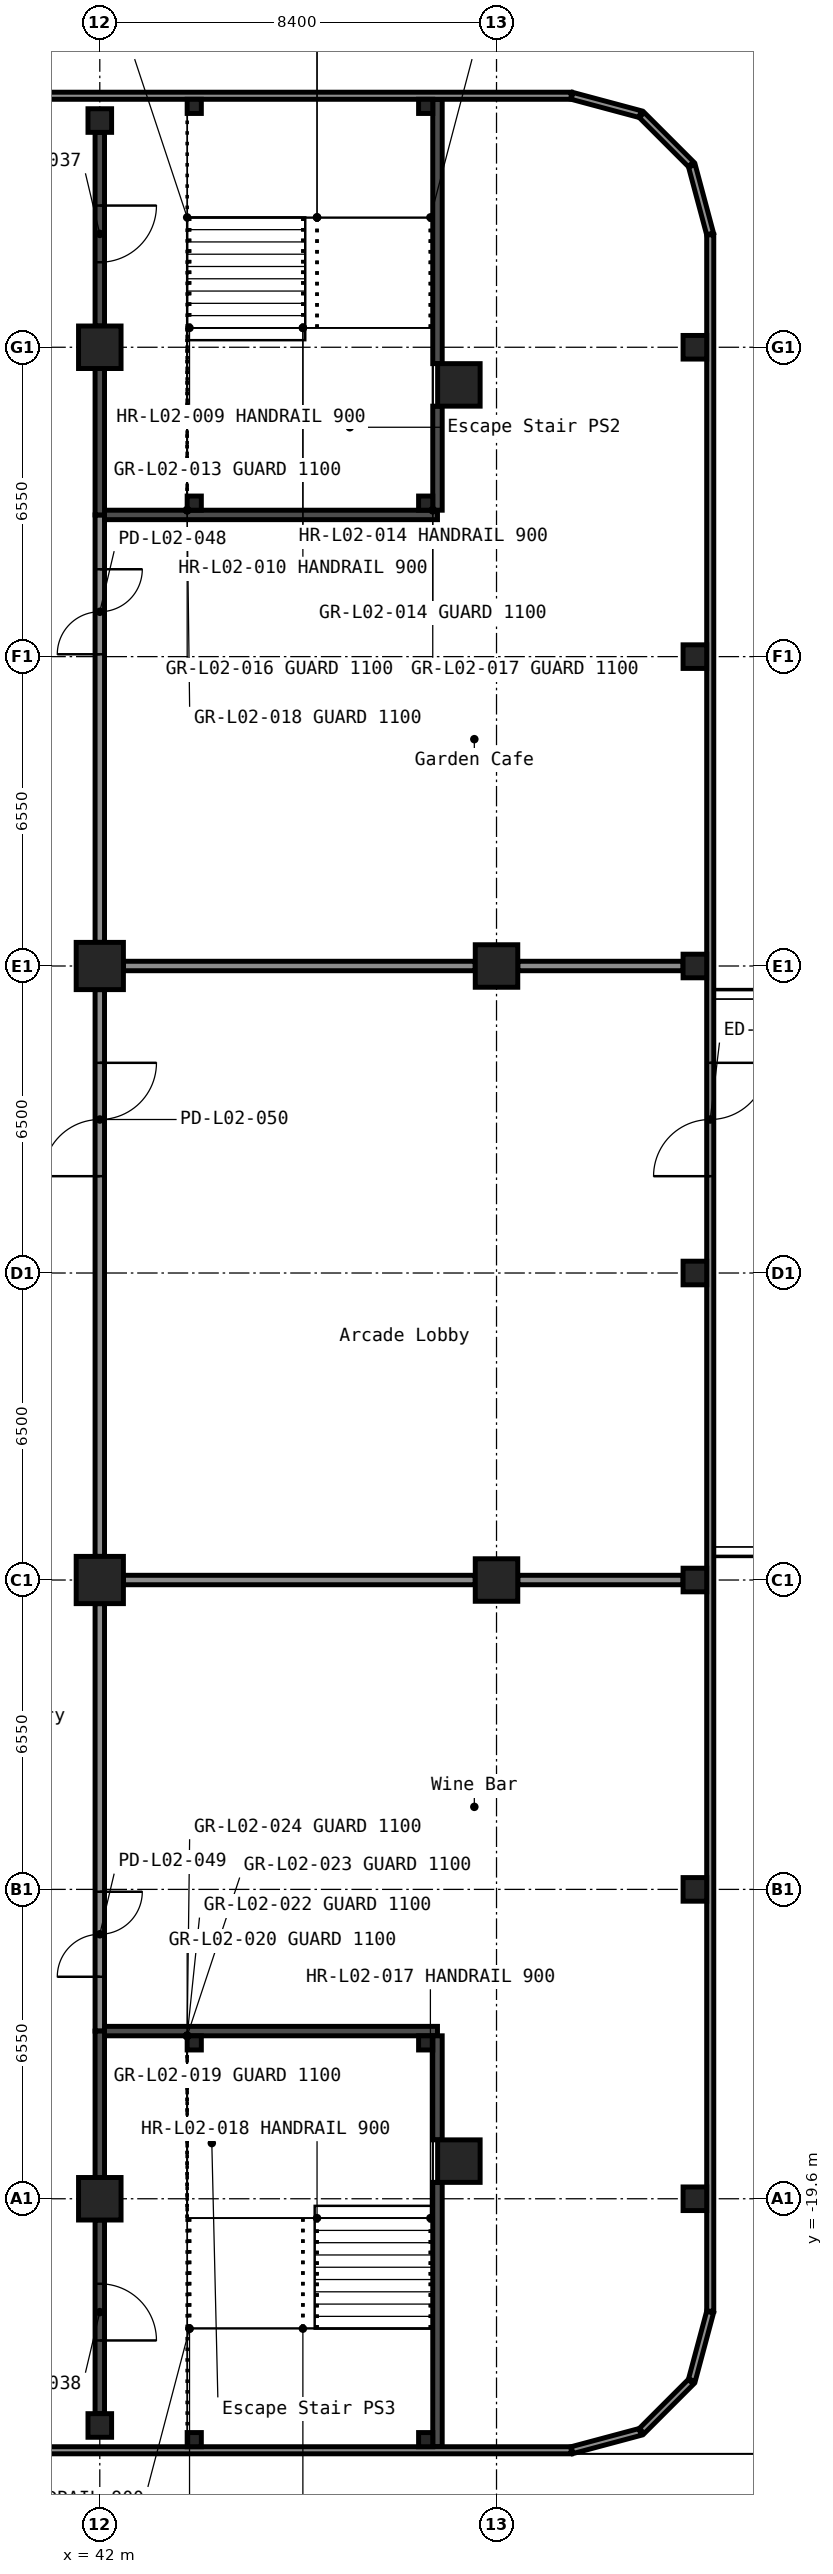
"""IFC4 building model, lengths in metres.
Left out: names, types, materials, properties, quantities, classifications, styles, units other than length and angle.
Written with IfcOpenShell. Run it as: python <this file> out.ifc"""

import sys

from ifc_helpers import new_model, si_unit, direction, frame, frame_2d, origin, origin_2d, place, context, subcontext, project, spatial, rectangle, hollow_rectangle, extrude, element, fill, save


model = new_model("IFC4")
c1 = context("Model", 3, precision=1e-05, world=origin(), true_north=direction((0.0, 1.0)))
c2 = subcontext(c1, "Body", "Model", "MODEL_VIEW")
j1 = project(units=[si_unit("LENGTHUNIT", "METRE"), si_unit("PLANEANGLEUNIT", "RADIAN")], contexts=[c1])
p1 = place(None, origin())
s1 = spatial("IfcSite", under=j1, at=p1, CompositionType="ELEMENT")
p2 = place(p1, origin())
s2 = spatial("IfcBuilding", under=s1, at=p2, CompositionType="ELEMENT")
p3 = place(p2, frame((0.0, 0.0, 9.0)))
s3 = spatial("IfcBuildingStorey", under=s2, at=p3, CompositionType="ELEMENT", Elevation=9.0)
p4 = place(p3, frame((42.0, -19.6, 0.0), z_axis=(0.0, 0.0, 1.0), x_axis=(1.0, 0.0, 0.0)))
e1 = element("IfcColumn", 1, at=p4, inside=s3, PredefinedType="COLUMN", context=c2, shape_type="SweptSolid", body=[
    extrude(hollow_rectangle(XDim=0.9, YDim=0.9, WallThickness=0.036, at=origin_2d()), origin(), (0.0, 0.0, 1.0), 5.6),
])
for number, where, z_axis, x_axis in (
    (2, (42.0, -6.5, 0.0), (0.0, 0.0, 1.0), (1.0, 0.0, 0.0)),
    (3, (42.0, 6.5, 0.0), (0.0, 0.0, 1.0), (1.0, 0.0, 0.0)),
):
    element("IfcColumn", number, at=place(p3, frame(where, z_axis=z_axis, x_axis=x_axis)), inside=s3, PredefinedType="COLUMN", context=c2, shape_type="SweptSolid", body=[
        extrude(hollow_rectangle(XDim=1.0, YDim=1.0, WallThickness=0.04, at=origin_2d()), origin(), (0.0, 0.0, 1.0), 5.6),
    ])
for number, where, z_axis, x_axis in (
    (4, (42.0, 19.6, 0.0), (0.0, 0.0, 1.0), (1.0, 0.0, 0.0)),
    (5, (49.603, -18.803, 0.0), (0.0, 0.0, 1.0), (1.0, 0.0, 0.0)),
    (6, (50.4, -6.5, 0.0), (0.0, 0.0, 1.0), (1.0, 0.0, 0.0)),
    (7, (50.4, 6.5, 0.0), (0.0, 0.0, 1.0), (1.0, 0.0, 0.0)),
    (8, (49.603, 18.803, 0.0), (0.0, 0.0, 1.0), (1.0, 0.0, 0.0)),
):
    element("IfcColumn", number, at=place(p3, frame(where, z_axis=z_axis, x_axis=x_axis)), inside=s3, PredefinedType="COLUMN", context=c2, shape_type="SweptSolid", body=[
        extrude(hollow_rectangle(XDim=0.9, YDim=0.9, WallThickness=0.036, at=origin_2d()), origin(), (0.0, 0.0, 1.0), 5.6),
    ])
for number, where, z_axis, x_axis in (
    (9, (42.0, -24.4, 0.0), (0.0, 0.0, 1.0), (1.0, 0.0, 0.0)),
    (10, (42.0, 24.4, 0.0), (0.0, 0.0, 1.0), (1.0, 0.0, 0.0)),
    (11, (54.6, -19.6, 0.0), (0.0, 0.0, 1.0), (1.0, 0.0, 0.0)),
    (12, (54.6, -13.05, 0.0), (0.0, 0.0, 1.0), (1.0, 0.0, 0.0)),
    (13, (54.6, -6.5, 0.0), (0.0, 0.0, 1.0), (1.0, 0.0, 0.0)),
    (14, (54.6, 0.0, 0.0), (0.0, 0.0, 1.0), (1.0, 0.0, 0.0)),
    (15, (54.6, 6.5, 0.0), (0.0, 0.0, 1.0), (1.0, 0.0, 0.0)),
    (16, (54.6, 13.05, 0.0), (0.0, 0.0, 1.0), (1.0, 0.0, 0.0)),
    (17, (54.6, 19.6, 0.0), (0.0, 0.0, 1.0), (1.0, 0.0, 0.0)),
):
    element("IfcColumn", number, at=place(p3, frame(where, z_axis=z_axis, x_axis=x_axis)), inside=s3, PredefinedType="COLUMN", context=c2, shape_type="SweptSolid", body=[
        extrude(hollow_rectangle(XDim=0.5, YDim=0.5, WallThickness=0.019, InnerFilletRadius=0.029, OuterFilletRadius=0.048, at=origin_2d()), origin(), (0.0, 0.0, 1.0), 5.6),
    ])
for number, where, z_axis, x_axis in (
    (18, (44.0, 16.3, -0.3), (0.0, 0.0, 1.0), (1.0, 0.0, 0.0)),
    (19, (48.9, 16.3, -0.3), (0.0, 0.0, 1.0), (1.0, 0.0, 0.0)),
    (20, (48.9, -16.3, -0.3), (0.0, 0.0, 1.0), (1.0, 0.0, 0.0)),
    (21, (44.0, -16.3, -0.3), (0.0, 0.0, 1.0), (1.0, 0.0, 0.0)),
):
    element("IfcColumn", number, at=place(p3, frame(where, z_axis=z_axis, x_axis=x_axis)), inside=s3, PredefinedType="COLUMN", context=c2, shape_type="SweptSolid", body=[
        extrude(rectangle(XDim=0.3, YDim=0.3, at=origin_2d()), origin(), (0.0, 0.0, 1.0), 1.55),
    ])
p5 = place(p3, frame((54.35, -6.5, 0.0), z_axis=(0.0, 0.0, 1.0), x_axis=(-1.0, 0.0, 0.0)))
e22 = element("IfcWall", 22, at=p5, inside=s3, PredefinedType="PARTITIONING", context=c2, shape_type="SweptSolid", body=[
    extrude(rectangle(XDim=3.5, YDim=0.2, at=frame_2d((1.75, 0.0))), origin(), (0.0, 0.0, 1.0), 5.6),
])
p6 = place(p3, frame((49.95, -6.5, 0.0), z_axis=(0.0, 0.0, 1.0), x_axis=(-1.0, 0.0, 0.0)))
e23 = element("IfcWall", 23, at=p6, inside=s3, PredefinedType="PARTITIONING", context=c2, shape_type="SweptSolid", body=[
    extrude(rectangle(XDim=7.45, YDim=0.2, at=frame_2d((3.725, 0.0))), origin(), (0.0, 0.0, 1.0), 5.6),
])
p7 = place(p3, frame((54.35, 6.5, 0.0), z_axis=(0.0, 0.0, 1.0), x_axis=(-1.0, 0.0, 0.0)))
e24 = element("IfcWall", 24, at=p7, inside=s3, PredefinedType="PARTITIONING", context=c2, shape_type="SweptSolid", body=[
    extrude(rectangle(XDim=3.5, YDim=0.2, at=frame_2d((1.75, 0.0))), origin(), (0.0, 0.0, 1.0), 5.6),
])
p8 = place(p3, frame((49.95, 6.5, 0.0), z_axis=(0.0, 0.0, 1.0), x_axis=(-1.0, 0.0, 0.0)))
e25 = element("IfcWall", 25, at=p8, inside=s3, PredefinedType="PARTITIONING", context=c2, shape_type="SweptSolid", body=[
    extrude(rectangle(XDim=7.45, YDim=0.2, at=frame_2d((3.725, 0.0))), origin(), (0.0, 0.0, 1.0), 5.6),
])
p9 = place(p3, frame((42.0, 6.0, 0.0), z_axis=(0.0, 0.0, 1.0), x_axis=(0.0, -1.0, 0.0)))
e26 = element("IfcWall", 26, at=p9, inside=s3, PredefinedType="PARTITIONING", context=c2, shape_type="SweptSolid", body=[
    extrude(rectangle(XDim=12.0, YDim=0.2, at=frame_2d((6.0, 0.0))), origin(), (0.0, 0.0, 1.0), 5.6),
])
p10 = place(p9, frame((1.55, 0.0, 0.0)))
e27 = element("IfcOpeningElement", 27, at=p10, cuts=e26, PredefinedType="OPENING", context=c2, shape_type="SweptSolid", body=[
    extrude(rectangle(XDim=2.4, YDim=2.1, at=frame_2d((1.2, 1.05))), frame((0.0, 0.11, 0.0), z_axis=(0.0, -1.0, 0.0), x_axis=(1.0, 0.0, 0.0)), (0.0, 0.0, 1.0), 0.22),
])
p11 = place(p3, frame((42.0, -7.0, 0.0), z_axis=(0.0, 0.0, 1.0), x_axis=(0.0, -1.0, 0.0)))
e28 = element("IfcWall", 28, at=p11, inside=s3, PredefinedType="PARTITIONING", context=c2, shape_type="SweptSolid", body=[
    extrude(rectangle(XDim=9.05, YDim=0.2, at=frame_2d((4.525, 0.0))), origin(), (0.0, 0.0, 1.0), 5.6),
])
p12 = place(p11, frame((6.1, 0.0, 0.0)))
e29 = element("IfcOpeningElement", 29, at=p12, cuts=e28, PredefinedType="OPENING", context=c2, shape_type="SweptSolid", body=[
    extrude(rectangle(XDim=1.8, YDim=2.1, at=frame_2d((0.9, 1.05))), frame((0.0, 0.11, 0.0), z_axis=(0.0, -1.0, 0.0), x_axis=(1.0, 0.0, 0.0)), (0.0, 0.0, 1.0), 0.22),
])
p13 = place(p3, frame((42.0, 16.05, 0.0), z_axis=(0.0, 0.0, 1.0), x_axis=(0.0, -1.0, 0.0)))
e30 = element("IfcWall", 30, at=p13, inside=s3, PredefinedType="PARTITIONING", context=c2, shape_type="SweptSolid", body=[
    extrude(rectangle(XDim=9.05, YDim=0.2, at=frame_2d((4.525, 0.0))), origin(), (0.0, 0.0, 1.0), 5.6),
])
p14 = place(p13, frame((1.15, 0.0, 0.0)))
e31 = element("IfcOpeningElement", 31, at=p14, cuts=e30, PredefinedType="OPENING", context=c2, shape_type="SweptSolid", body=[
    extrude(rectangle(XDim=1.8, YDim=2.1, at=frame_2d((0.9, 1.05))), frame((0.0, 0.11, 0.0), z_axis=(0.0, -1.0, 0.0), x_axis=(1.0, 0.0, 0.0)), (0.0, 0.0, 1.0), 0.22),
])
p15 = place(p3, frame((49.15, 16.05, 0.0), z_axis=(0.0, 0.0, 1.0), x_axis=(-1.0, 0.0, 0.0)))
e32 = element("IfcWall", 32, at=p15, inside=s3, PredefinedType="SHEAR", context=c2, shape_type="SweptSolid", body=[
    extrude(rectangle(XDim=7.05, YDim=0.2, at=frame_2d((3.525, 0.0))), origin(), (0.0, 0.0, 1.0), 5.6),
])
p16 = place(p3, frame((49.15, 24.85, 0.0), z_axis=(0.0, 0.0, 1.0), x_axis=(0.0, -1.0, 0.0)))
e33 = element("IfcWall", 33, at=p16, inside=s3, PredefinedType="SHEAR", context=c2, shape_type="SweptSolid", body=[
    extrude(rectangle(XDim=5.597, YDim=0.2, at=frame_2d((2.798, 0.0))), origin(), (0.0, 0.0, 1.0), 5.6),
])
p17 = place(p3, frame((49.15, 18.353, 0.0), z_axis=(0.0, 0.0, 1.0), x_axis=(0.0, -1.0, 0.0)))
e34 = element("IfcWall", 34, at=p17, inside=s3, PredefinedType="SHEAR", context=c2, shape_type="SweptSolid", body=[
    extrude(rectangle(XDim=2.203, YDim=0.2, at=frame_2d((1.102, 0.0))), origin(), (0.0, 0.0, 1.0), 5.6),
])
p18 = place(p3, frame((42.0, 16.05, 0.0), z_axis=(0.0, 0.0, 1.0), x_axis=(0.0, 1.0, 0.0)))
e35 = element("IfcWall", 35, at=p18, inside=s3, PredefinedType="SHEAR", context=c2, shape_type="SweptSolid", body=[
    extrude(rectangle(XDim=3.1, YDim=0.2, at=frame_2d((1.55, 0.0))), origin(), (0.0, 0.0, 1.0), 5.6),
])
p19 = place(p3, frame((42.0, 20.05, 0.0), z_axis=(0.0, 0.0, 1.0), x_axis=(0.0, 1.0, 0.0)))
e36 = element("IfcWall", 36, at=p19, inside=s3, PredefinedType="SHEAR", context=c2, shape_type="SweptSolid", body=[
    extrude(rectangle(XDim=4.1, YDim=0.2, at=frame_2d((2.05, 0.0))), origin(), (0.0, 0.0, 1.0), 5.6),
])
p20 = place(p19, frame((1.35, 0.0, 0.0)))
e37 = element("IfcOpeningElement", 37, at=p20, cuts=e36, PredefinedType="OPENING", context=c2, shape_type="SweptSolid", body=[
    extrude(rectangle(XDim=1.2, YDim=2.1, at=frame_2d((0.6, 1.05))), frame((0.0, 0.11, 0.0), z_axis=(0.0, -1.0, 0.0), x_axis=(1.0, 0.0, 0.0)), (0.0, 0.0, 1.0), 0.22),
])
p21 = place(p3, frame((42.1, -16.05, 0.0), z_axis=(0.0, 0.0, 1.0), x_axis=(1.0, 0.0, 0.0)))
e38 = element("IfcWall", 38, at=p21, inside=s3, PredefinedType="SHEAR", context=c2, shape_type="SweptSolid", body=[
    extrude(rectangle(XDim=7.05, YDim=0.2, at=frame_2d((3.525, 0.0))), origin(), (0.0, 0.0, 1.0), 5.6),
])
p22 = place(p3, frame((49.15, -16.15, 0.0), z_axis=(0.0, 0.0, 1.0), x_axis=(0.0, -1.0, 0.0)))
e39 = element("IfcWall", 39, at=p22, inside=s3, PredefinedType="SHEAR", context=c2, shape_type="SweptSolid", body=[
    extrude(rectangle(XDim=2.203, YDim=0.2, at=frame_2d((1.102, 0.0))), origin(), (0.0, 0.0, 1.0), 5.6),
])
p23 = place(p3, frame((49.15, -19.253, 0.0), z_axis=(0.0, 0.0, 1.0), x_axis=(0.0, -1.0, 0.0)))
e40 = element("IfcWall", 40, at=p23, inside=s3, PredefinedType="SHEAR", context=c2, shape_type="SweptSolid", body=[
    extrude(rectangle(XDim=5.597, YDim=0.2, at=frame_2d((2.798, 0.0))), origin(), (0.0, 0.0, 1.0), 5.6),
])
p24 = place(p3, frame((42.0, -24.15, 0.0), z_axis=(0.0, 0.0, 1.0), x_axis=(0.0, 1.0, 0.0)))
e41 = element("IfcWall", 41, at=p24, inside=s3, PredefinedType="SHEAR", context=c2, shape_type="SweptSolid", body=[
    extrude(rectangle(XDim=4.1, YDim=0.2, at=frame_2d((2.05, 0.0))), origin(), (0.0, 0.0, 1.0), 5.6),
])
p25 = place(p24, frame((1.55, 0.0, 0.0)))
e42 = element("IfcOpeningElement", 42, at=p25, cuts=e41, PredefinedType="OPENING", context=c2, shape_type="SweptSolid", body=[
    extrude(rectangle(XDim=1.2, YDim=2.1, at=frame_2d((0.6, 1.05))), frame((0.0, 0.11, 0.0), z_axis=(0.0, -1.0, 0.0), x_axis=(1.0, 0.0, 0.0)), (0.0, 0.0, 1.0), 0.22),
])
p26 = place(p3, frame((42.0, -19.15, 0.0), z_axis=(0.0, 0.0, 1.0), x_axis=(0.0, 1.0, 0.0)))
e43 = element("IfcWall", 43, at=p26, inside=s3, PredefinedType="SHEAR", context=c2, shape_type="SweptSolid", body=[
    extrude(rectangle(XDim=3.1, YDim=0.2, at=frame_2d((1.55, 0.0))), origin(), (0.0, 0.0, 1.0), 5.6),
])
p27 = place(p3, frame((54.922, -22.0, 0.0), z_axis=(0.0, 0.0, 1.0), x_axis=(-0.258741535379, -0.965946591624, 0.0)))
e44 = element("IfcWall", 44, at=p27, inside=s3, PredefinedType="STANDARD", context=c2, shape_type="SweptSolid", body=[
    extrude(rectangle(XDim=1.493, YDim=0.15, at=frame_2d((0.746, 0.0))), origin(), (0.0, 0.0, 1.0), 5.6),
])
p28 = place(p3, frame((54.517, -23.475, 0.0), z_axis=(0.0, 0.0, 1.0), x_axis=(-0.707106781187, -0.707106781187, 0.0)))
e45 = element("IfcWall", 45, at=p28, inside=s3, PredefinedType="STANDARD", context=c2, shape_type="SweptSolid", body=[
    extrude(rectangle(XDim=1.473, YDim=0.15, at=frame_2d((0.736, 0.0))), origin(), (0.0, 0.0, 1.0), 5.6),
])
p29 = place(p3, frame((53.442, -24.536, 0.0), z_axis=(0.0, 0.0, 1.0), x_axis=(-0.965946591624, -0.258741535379, 0.0)))
e46 = element("IfcWall", 46, at=p29, inside=s3, PredefinedType="STANDARD", context=c2, shape_type="SweptSolid", body=[
    extrude(rectangle(XDim=1.493, YDim=0.15, at=frame_2d((0.746, 0.0))), origin(), (0.0, 0.0, 1.0), 5.6),
])
for number, where, z_axis, x_axis in (
    (47, (51.98, -24.925, 0.0), (0.0, 0.0, 1.0), (-1.0, 0.0, 0.0)),
    (48, (39.0, 24.925, 0.0), (0.0, 0.0, 1.0), (1.0, 0.0, 0.0)),
):
    element("IfcWall", number, at=place(p3, frame(where, z_axis=z_axis, x_axis=x_axis)), inside=s3, PredefinedType="STANDARD", context=c2, shape_type="SweptSolid", body=[
        extrude(rectangle(XDim=12.98, YDim=0.15, at=frame_2d((6.49, 0.0))), origin(), (0.0, 0.0, 1.0), 5.6),
    ])
p30 = place(p3, frame((52.0, 24.922, 0.0), z_axis=(0.0, 0.0, 1.0), x_axis=(0.965946591624, -0.258741535379, 0.0)))
e49 = element("IfcWall", 49, at=p30, inside=s3, PredefinedType="STANDARD", context=c2, shape_type="SweptSolid", body=[
    extrude(rectangle(XDim=1.493, YDim=0.15, at=frame_2d((0.746, 0.0))), origin(), (0.0, 0.0, 1.0), 5.6),
])
p31 = place(p3, frame((53.475, 24.517, 0.0), z_axis=(0.0, 0.0, 1.0), x_axis=(0.707106781187, -0.707106781187, 0.0)))
e50 = element("IfcWall", 50, at=p31, inside=s3, PredefinedType="STANDARD", context=c2, shape_type="SweptSolid", body=[
    extrude(rectangle(XDim=1.473, YDim=0.15, at=frame_2d((0.736, 0.0))), origin(), (0.0, 0.0, 1.0), 5.6),
])
p32 = place(p3, frame((54.536, 23.442, 0.0), z_axis=(0.0, 0.0, 1.0), x_axis=(0.258741535379, -0.965946591624, 0.0)))
e51 = element("IfcWall", 51, at=p32, inside=s3, PredefinedType="STANDARD", context=c2, shape_type="SweptSolid", body=[
    extrude(rectangle(XDim=1.493, YDim=0.15, at=frame_2d((0.746, 0.0))), origin(), (0.0, 0.0, 1.0), 5.6),
])
p33 = place(p3, frame((54.925, 21.98, 0.0), z_axis=(0.0, 0.0, 1.0), x_axis=(0.0, -1.0, 0.0)))
e52 = element("IfcWall", 52, at=p33, inside=s3, PredefinedType="STANDARD", context=c2, shape_type="SweptSolid", body=[
    extrude(rectangle(XDim=43.96, YDim=0.15, at=frame_2d((21.98, 0.0))), origin(), (0.0, 0.0, 1.0), 5.6),
])
p34 = place(p33, frame((17.53, 0.0, 0.0)))
e53 = element("IfcOpeningElement", 53, at=p34, cuts=e52, PredefinedType="OPENING", context=c2, shape_type="SweptSolid", body=[
    extrude(rectangle(XDim=2.4, YDim=2.1, at=frame_2d((1.2, 1.05))), frame((0.0, 0.085, 0.0), z_axis=(0.0, -1.0, 0.0), x_axis=(1.0, 0.0, 0.0)), (0.0, 0.0, 1.0), 0.17),
])
for number, where, z_axis, x_axis in (
    (54, (44.0, 24.7, 0.0), (0.0, 0.0, 1.0), (1.0, 0.0, 0.0)),
    (55, (48.9, 24.7, 0.0), (0.0, 0.0, 1.0), (1.0, 0.0, 0.0)),
    (56, (44.0, 16.3, 1.5), (0.0, 0.0, 1.0), (1.0, 0.0, 0.0)),
    (57, (48.9, 16.3, 1.5), (0.0, 0.0, 1.0), (1.0, 0.0, 0.0)),
    (58, (48.9, -24.7, 0.0), (0.0, 0.0, 1.0), (1.0, 0.0, 0.0)),
    (59, (44.0, -24.7, 0.0), (0.0, 0.0, 1.0), (1.0, 0.0, 0.0)),
    (60, (48.9, -16.3, 1.5), (0.0, 0.0, 1.0), (1.0, 0.0, 0.0)),
    (61, (44.0, -16.3, 1.5), (0.0, 0.0, 1.0), (1.0, 0.0, 0.0)),
):
    element("IfcColumn", number, at=place(p3, frame(where, z_axis=z_axis, x_axis=x_axis)), inside=s3, PredefinedType="COLUMN", context=c2, shape_type="SweptSolid", body=[
        extrude(rectangle(XDim=0.3, YDim=0.3, at=origin_2d()), origin(), (0.0, 0.0, 1.0), 2.75),
    ])
p35 = place(p20, origin())
e62 = element("IfcDoor", 62, at=p35, inside=s3, OperationType="SINGLE_SWING_RIGHT", PredefinedType="DOOR", context=c2, shape_type="SweptSolid", body=[
    extrude(rectangle(XDim=1.2, YDim=2.1, at=frame_2d((0.6, 1.05))), frame((0.0, 0.025, 0.0), z_axis=(0.0, -1.0, 0.0), x_axis=(1.0, 0.0, 0.0)), (0.0, 0.0, 1.0), 0.05),
])
fill(e37, e62)
p36 = place(p25, origin())
e63 = element("IfcDoor", 63, at=p36, inside=s3, OperationType="SINGLE_SWING_LEFT", PredefinedType="DOOR", context=c2, shape_type="SweptSolid", body=[
    extrude(rectangle(XDim=1.2, YDim=2.1, at=frame_2d((0.6, 1.05))), frame((0.0, 0.025, 0.0), z_axis=(0.0, -1.0, 0.0), x_axis=(1.0, 0.0, 0.0)), (0.0, 0.0, 1.0), 0.05),
])
fill(e42, e63)
p37 = place(p14, origin())
e64 = element("IfcDoor", 64, at=p37, inside=s3, OperationType="DOUBLE_DOOR_SINGLE_SWING", PredefinedType="DOOR", context=c2, shape_type="SweptSolid", body=[
    extrude(rectangle(XDim=1.8, YDim=2.1, at=frame_2d((0.9, 1.05))), frame((0.0, 0.025, 0.0), z_axis=(0.0, -1.0, 0.0), x_axis=(1.0, 0.0, 0.0)), (0.0, 0.0, 1.0), 0.05),
])
fill(e31, e64)
p38 = place(p12, origin())
e65 = element("IfcDoor", 65, at=p38, inside=s3, OperationType="DOUBLE_DOOR_SINGLE_SWING", PredefinedType="DOOR", context=c2, shape_type="SweptSolid", body=[
    extrude(rectangle(XDim=1.8, YDim=2.1, at=frame_2d((0.9, 1.05))), frame((0.0, 0.025, 0.0), z_axis=(0.0, -1.0, 0.0), x_axis=(1.0, 0.0, 0.0)), (0.0, 0.0, 1.0), 0.05),
])
fill(e29, e65)
p39 = place(p10, origin())
e66 = element("IfcDoor", 66, at=p39, inside=s3, OperationType="DOUBLE_DOOR_SINGLE_SWING", PredefinedType="DOOR", context=c2, shape_type="SweptSolid", body=[
    extrude(rectangle(XDim=2.4, YDim=2.1, at=frame_2d((1.2, 1.05))), frame((0.0, 0.025, 0.0), z_axis=(0.0, -1.0, 0.0), x_axis=(1.0, 0.0, 0.0)), (0.0, 0.0, 1.0), 0.05),
])
fill(e27, e66)
p40 = place(p34, origin())
e67 = element("IfcDoor", 67, at=p40, inside=s3, OperationType="DOUBLE_DOOR_DOUBLE_SWING", PredefinedType="DOOR", context=c2, shape_type="SweptSolid", body=[
    extrude(rectangle(XDim=2.4, YDim=2.1, at=frame_2d((1.2, 1.05))), frame((0.0, 0.025, 0.0), z_axis=(0.0, -1.0, 0.0), x_axis=(1.0, 0.0, 0.0)), (0.0, 0.0, 1.0), 0.05),
])
fill(e53, e67)
save(model, sys.argv[1])
